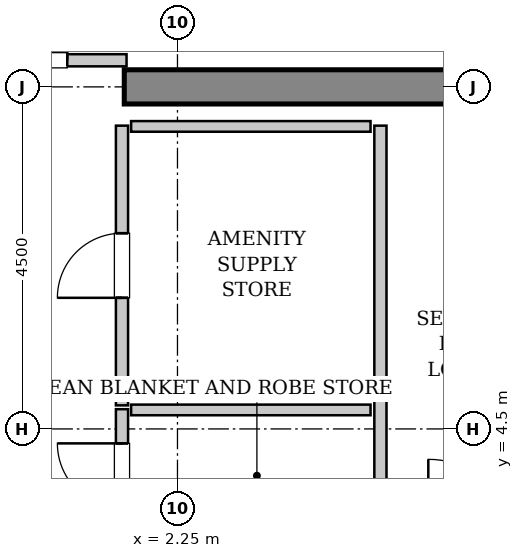
"""IFC4 building model, lengths in metres.
Left out: names, types, materials, properties, quantities, classifications, styles, units other than length and angle.
Written with IfcOpenShell. Run it as: python <this file> out.ifc"""

import sys

from ifc_helpers import new_model, si_unit, direction, frame, frame_2d, origin, place, context, subcontext, project, spatial, rectangle, extrude, source, transform, mapped, element, fill, save


model = new_model("IFC4")
c1 = context("Model", 3, precision=1e-05, world=origin(), true_north=direction((0.0, 1.0)))
c2 = subcontext(c1, "Body", "Model", "MODEL_VIEW")
j1 = project(units=[si_unit("LENGTHUNIT", "METRE"), si_unit("PLANEANGLEUNIT", "RADIAN")], contexts=[c1])
p1 = place(None, origin())
s1 = spatial("IfcSite", under=j1, at=p1, CompositionType="ELEMENT")
p2 = place(p1, origin())
s2 = spatial("IfcBuilding", under=s1, at=p2, CompositionType="ELEMENT")
p3 = place(p2, frame((0.0, 0.0, 268.4)))
s3 = spatial("IfcBuildingStorey", under=s2, at=p3, CompositionType="ELEMENT", Elevation=268.4)
m1 = source(origin(), c2, "Body", "SweptSolid", [
    extrude(rectangle(XDim=9.925, YDim=0.45, at=frame_2d((4.962, 0.0))), origin(), (0.0, 0.0, 1.0), 3.8),
])
p4 = place(p3, frame((1.55, 9.0, 0.0), z_axis=(0.0, 0.0, 1.0), x_axis=(1.0, 0.0, 0.0)))
e1 = element("IfcWall", 1, at=p4, inside=s3, PredefinedType="SHEAR", context=c2, shape_type="MappedRepresentation", body=[
    mapped(m1, transform((0.0, 0.0, 0.0), x_axis=(1.0, 0.0, 0.0), y_axis=(0.0, 1.0, 0.0), z_axis=(0.0, 0.0, 1.0), scale=1.0)),
])
m2 = source(origin(), c2, "Body", "SweptSolid", [
    extrude(rectangle(XDim=3.16, YDim=0.16, at=frame_2d((1.58, 0.0))), origin(), (0.0, 0.0, 1.0), 2.625),
])
p5 = place(p3, frame((-1.58, 9.35, 0.0), z_axis=(0.0, 0.0, 1.0), x_axis=(1.0, 0.0, 0.0)))
e2 = element("IfcWall", 2, at=p5, inside=s3, PredefinedType="PARTITIONING", context=c2, shape_type="MappedRepresentation", body=[
    mapped(m2, transform((0.0, 0.0, 0.0), x_axis=(1.0, 0.0, 0.0), y_axis=(0.0, 1.0, 0.0), z_axis=(0.0, 0.0, 1.0), scale=1.0)),
])
p6 = place(p5, frame((0.78, 0.0, 0.0)))
e3 = element("IfcOpeningElement", 3, at=p6, cuts=e2, PredefinedType="OPENING", context=c2, shape_type="SweptSolid", body=[
    extrude(rectangle(XDim=1.6, YDim=2.3, at=frame_2d((0.8, 1.15))), frame((0.0, 0.09, 0.0), z_axis=(0.0, -1.0, 0.0), x_axis=(1.0, 0.0, 0.0)), (0.0, 0.0, 1.0), 0.18),
])
m3 = source(origin(), c2, "Body", "SweptSolid", [
    extrude(rectangle(XDim=5.45, YDim=0.16, at=frame_2d((2.725, 0.0))), origin(), (0.0, 0.0, 1.0), 3.535),
])
p7 = place(p3, frame((4.92, 3.04, 0.0), z_axis=(0.0, 0.0, 1.0), x_axis=(0.0, 1.0, 0.0)))
e4 = element("IfcWall", 4, at=p7, inside=s3, PredefinedType="PARTITIONING", context=c2, shape_type="MappedRepresentation", body=[
    mapped(m3, transform((0.0, 0.0, 0.0), x_axis=(1.0, 0.0, 0.0), y_axis=(0.0, 1.0, 0.0), z_axis=(0.0, 0.0, 1.0), scale=1.0)),
])
m4 = source(origin(), c2, "Body", "SweptSolid", [
    extrude(rectangle(XDim=1.75, YDim=0.16, at=frame_2d((0.875, 0.0))), origin(), (0.0, 0.0, 1.0), 3.535),
])
p8 = place(p3, frame((1.52, 3.01, 0.0), z_axis=(0.0, 0.0, 1.0), x_axis=(0.0, 1.0, 0.0)))
e5 = element("IfcWall", 5, at=p8, inside=s3, PredefinedType="PARTITIONING", context=c2, shape_type="MappedRepresentation", body=[
    mapped(m4, transform((0.0, 0.0, 0.0), x_axis=(1.0, 0.0, 0.0), y_axis=(0.0, 1.0, 0.0), z_axis=(0.0, 0.0, 1.0), scale=1.0)),
])
p9 = place(p8, frame((0.45, 0.0, 0.0)))
e6 = element("IfcOpeningElement", 6, at=p9, cuts=e5, PredefinedType="OPENING", context=c2, shape_type="SweptSolid", body=[
    extrude(rectangle(XDim=0.85, YDim=2.1, at=frame_2d((0.425, 1.05))), frame((0.0, 0.09, 0.0), z_axis=(0.0, -1.0, 0.0), x_axis=(1.0, 0.0, 0.0)), (0.0, 0.0, 1.0), 0.18),
])
m5 = source(origin(), c2, "Body", "SweptSolid", [
    extrude(rectangle(XDim=3.15, YDim=0.14, at=frame_2d((1.575, 0.0))), origin(), (0.0, 0.0, 1.0), 3.535),
])
p10 = place(p3, frame((1.64, 4.75, 0.0), z_axis=(0.0, 0.0, 1.0), x_axis=(1.0, 0.0, 0.0)))
e7 = element("IfcWall", 7, at=p10, inside=s3, PredefinedType="PARTITIONING", context=c2, shape_type="MappedRepresentation", body=[
    mapped(m5, transform((0.0, 0.0, 0.0), x_axis=(1.0, 0.0, 0.0), y_axis=(0.0, 1.0, 0.0), z_axis=(0.0, 0.0, 1.0), scale=1.0)),
])
m6 = source(origin(), c2, "Body", "SweptSolid", [
    extrude(rectangle(XDim=3.68, YDim=0.16, at=frame_2d((1.84, 0.0))), origin(), (0.0, 0.0, 1.0), 3.535),
])
p11 = place(p3, frame((1.52, 4.81, 0.0), z_axis=(0.0, 0.0, 1.0), x_axis=(0.0, 1.0, 0.0)))
e8 = element("IfcWall", 8, at=p11, inside=s3, PredefinedType="PARTITIONING", context=c2, shape_type="MappedRepresentation", body=[
    mapped(m6, transform((0.0, 0.0, 0.0), x_axis=(1.0, 0.0, 0.0), y_axis=(0.0, 1.0, 0.0), z_axis=(0.0, 0.0, 1.0), scale=1.0)),
])
p12 = place(p11, frame((1.415, 0.0, 0.0)))
e9 = element("IfcOpeningElement", 9, at=p12, cuts=e8, PredefinedType="OPENING", context=c2, shape_type="SweptSolid", body=[
    extrude(rectangle(XDim=0.85, YDim=2.1, at=frame_2d((0.425, 1.05))), frame((0.0, 0.09, 0.0), z_axis=(0.0, -1.0, 0.0), x_axis=(1.0, 0.0, 0.0)), (0.0, 0.0, 1.0), 0.18),
])
p13 = place(p3, frame((1.64, 8.48, 0.0), z_axis=(0.0, 0.0, 1.0), x_axis=(1.0, 0.0, 0.0)))
e10 = element("IfcWall", 10, at=p13, inside=s3, PredefinedType="PARTITIONING", context=c2, shape_type="MappedRepresentation", body=[
    mapped(m5, transform((0.0, 0.0, 0.0), x_axis=(1.0, 0.0, 0.0), y_axis=(0.0, 1.0, 0.0), z_axis=(0.0, 0.0, 1.0), scale=1.0)),
])
m7 = source(origin(), c2, "Body", "SweptSolid", [
    extrude(rectangle(XDim=1.6, YDim=2.3, at=frame_2d((0.8, 1.15))), frame((0.0, 0.025, 0.0), z_axis=(0.0, -1.0, 0.0), x_axis=(1.0, 0.0, 0.0)), (0.0, 0.0, 1.0), 0.05),
])
p14 = place(p6, origin())
e11 = element("IfcDoor", 11, at=p14, inside=s3, OperationType="DOUBLE_DOOR_SINGLE_SWING", PredefinedType="DOOR", context=c2, shape_type="MappedRepresentation", body=[
    mapped(m7, transform((0.0, 0.0, 0.0), x_axis=(1.0, 0.0, 0.0), y_axis=(0.0, 1.0, 0.0), z_axis=(0.0, 0.0, 1.0), scale=1.0)),
])
fill(e3, e11)
m8 = source(origin(), c2, "Body", "SweptSolid", [
    extrude(rectangle(XDim=0.85, YDim=2.1, at=frame_2d((0.425, 1.05))), frame((0.0, 0.025, 0.0), z_axis=(0.0, -1.0, 0.0), x_axis=(1.0, 0.0, 0.0)), (0.0, 0.0, 1.0), 0.05),
])
p15 = place(p9, origin())
e12 = element("IfcDoor", 12, at=p15, inside=s3, OperationType="SINGLE_SWING_RIGHT", PredefinedType="DOOR", context=c2, shape_type="MappedRepresentation", body=[
    mapped(m8, transform((0.0, 0.0, 0.0), x_axis=(1.0, 0.0, 0.0), y_axis=(0.0, 1.0, 0.0), z_axis=(0.0, 0.0, 1.0), scale=1.0)),
])
fill(e6, e12)
p16 = place(p12, origin())
e13 = element("IfcDoor", 13, at=p16, inside=s3, OperationType="SINGLE_SWING_LEFT", PredefinedType="DOOR", context=c2, shape_type="MappedRepresentation", body=[
    mapped(m8, transform((0.0, 0.0, 0.0), x_axis=(1.0, 0.0, 0.0), y_axis=(0.0, 1.0, 0.0), z_axis=(0.0, 0.0, 1.0), scale=1.0)),
])
fill(e9, e13)
save(model, sys.argv[1])
